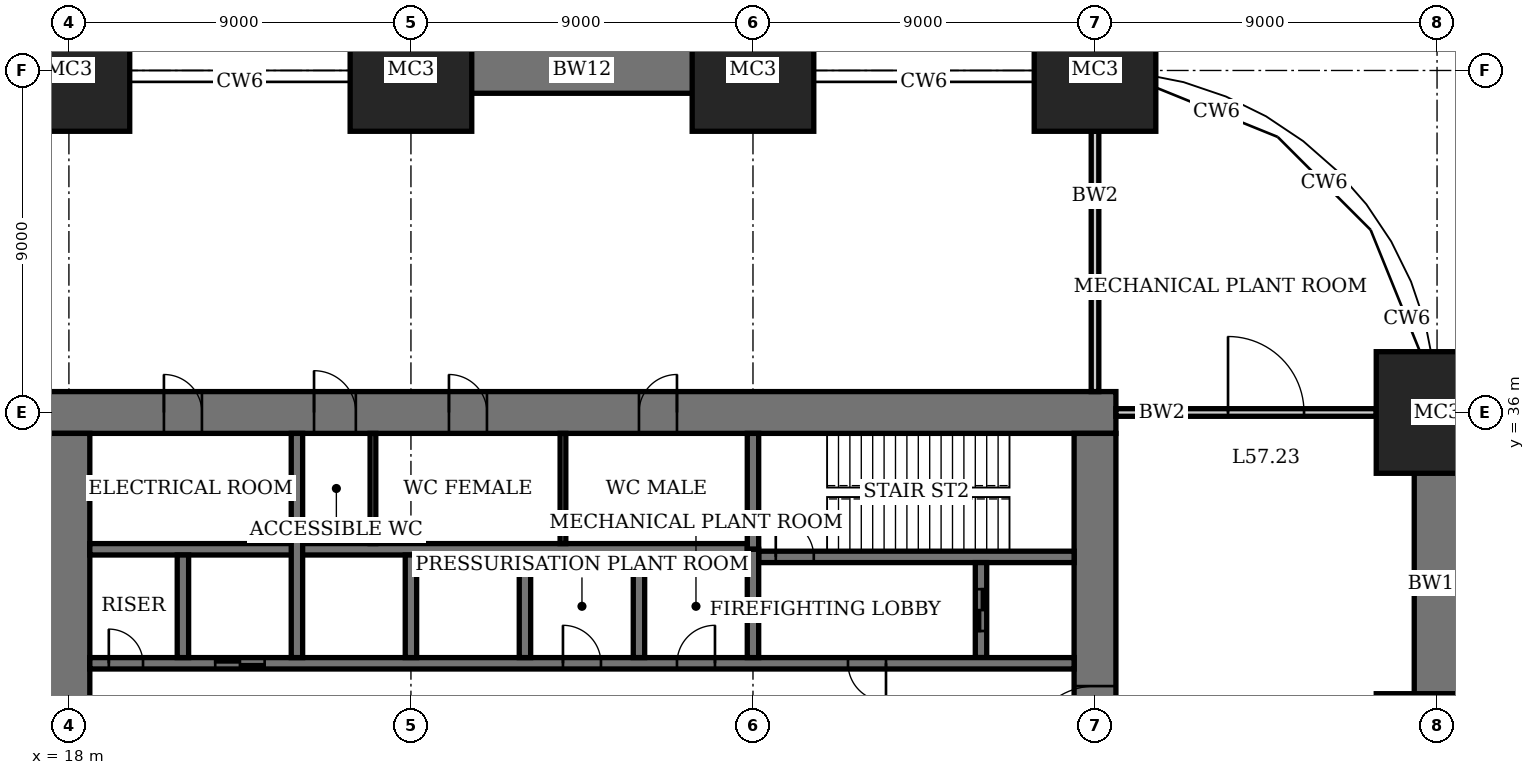
"""IFC4 building model, lengths in metres.
Left out: names, types, materials, properties, quantities, classifications, styles, units other than length and angle.
Written with IfcOpenShell. Run it as: python <this file> out.ifc"""

import sys

from ifc_helpers import new_model, si_unit, direction, frame, frame_2d, origin, origin_2d, place, context, subcontext, project, spatial, rectangle, extrude, element, fill, save


model = new_model("IFC4")
c1 = context("Model", 3, precision=1e-05, world=origin(), true_north=direction((0.0, 1.0)))
c2 = subcontext(c1, "Body", "Model", "MODEL_VIEW")
j1 = project(units=[si_unit("LENGTHUNIT", "METRE"), si_unit("PLANEANGLEUNIT", "RADIAN")], contexts=[c1])
p1 = place(None, origin())
s1 = spatial("IfcSite", under=j1, at=p1, CompositionType="ELEMENT")
p2 = place(p1, origin())
s2 = spatial("IfcBuilding", under=s1, at=p2, CompositionType="ELEMENT")
p3 = place(p2, frame((0.0, 0.0, 234.4)))
s3 = spatial("IfcBuildingStorey", under=s2, at=p3, CompositionType="ELEMENT", Elevation=234.4)
for number, where, z_axis, x_axis in (
    (1, (18.0, 45.0, 0.0), (0.0, 0.0, 1.0), (1.0, 0.0, 0.0)),
    (2, (27.0, 45.0, 0.0), (0.0, 0.0, 1.0), (1.0, 0.0, 0.0)),
    (3, (36.0, 45.0, 0.0), (0.0, 0.0, 1.0), (1.0, 0.0, 0.0)),
    (4, (45.0, 45.0, 0.0), (0.0, 0.0, 1.0), (1.0, 0.0, 0.0)),
    (5, (54.0, 27.0, 0.0), (0.0, 0.0, 1.0), (1.0, 0.0, 0.0)),
    (6, (54.0, 36.0, 0.0), (0.0, 0.0, 1.0), (1.0, 0.0, 0.0)),
):
    element("IfcColumn", number, at=place(p3, frame(where, z_axis=z_axis, x_axis=x_axis)), inside=s3, PredefinedType="COLUMN", context=c2, shape_type="SweptSolid", body=[
        extrude(rectangle(XDim=3.2, YDim=3.2, at=origin_2d()), origin(), (0.0, 0.0, 1.0), 5.0),
    ])
p4 = place(p3, frame((45.55, 36.0, 0.0), z_axis=(0.0, 0.0, 1.0), x_axis=(-1.0, 0.0, 0.0)))
e7 = element("IfcWall", 7, at=p4, inside=s3, PredefinedType="SHEAR", context=c2, shape_type="SweptSolid", body=[
    extrude(rectangle(XDim=28.1, YDim=1.1, at=frame_2d((14.05, 0.0))), origin(), (0.0, 0.0, 1.0), 5.0),
])
p5 = place(p4, frame((11.55, 0.0, 0.0)))
e8 = element("IfcOpeningElement", 8, at=p5, cuts=e7, PredefinedType="OPENING", context=c2, shape_type="SweptSolid", body=[
    extrude(rectangle(XDim=1.0, YDim=2.4, at=frame_2d((0.5, 1.2))), frame((0.0, 0.56, 0.0), z_axis=(0.0, -1.0, 0.0), x_axis=(1.0, 0.0, 0.0)), (0.0, 0.0, 1.0), 1.12),
])
p6 = place(p4, frame((16.55, 0.0, 0.0)))
e9 = element("IfcOpeningElement", 9, at=p6, cuts=e7, PredefinedType="OPENING", context=c2, shape_type="SweptSolid", body=[
    extrude(rectangle(XDim=1.0, YDim=2.4, at=frame_2d((0.5, 1.2))), frame((0.0, 0.56, 0.0), z_axis=(0.0, -1.0, 0.0), x_axis=(1.0, 0.0, 0.0)), (0.0, 0.0, 1.0), 1.12),
])
p7 = place(p4, frame((20.0, 0.0, 0.0)))
e10 = element("IfcOpeningElement", 10, at=p7, cuts=e7, PredefinedType="OPENING", context=c2, shape_type="SweptSolid", body=[
    extrude(rectangle(XDim=1.1, YDim=2.4, at=frame_2d((0.55, 1.2))), frame((0.0, 0.56, 0.0), z_axis=(0.0, -1.0, 0.0), x_axis=(1.0, 0.0, 0.0)), (0.0, 0.0, 1.0), 1.12),
])
p8 = place(p4, frame((24.05, 0.0, 0.0)))
e11 = element("IfcOpeningElement", 11, at=p8, cuts=e7, PredefinedType="OPENING", context=c2, shape_type="SweptSolid", body=[
    extrude(rectangle(XDim=1.0, YDim=2.4, at=frame_2d((0.5, 1.2))), frame((0.0, 0.56, 0.0), z_axis=(0.0, -1.0, 0.0), x_axis=(1.0, 0.0, 0.0)), (0.0, 0.0, 1.0), 1.12),
])
p9 = place(p3, frame((18.0, 35.45, 0.0), z_axis=(0.0, 0.0, 1.0), x_axis=(0.0, -1.0, 0.0)))
e12 = element("IfcWall", 12, at=p9, inside=s3, PredefinedType="SHEAR", context=c2, shape_type="SweptSolid", body=[
    extrude(rectangle(XDim=16.9, YDim=1.1, at=frame_2d((8.45, 0.0))), origin(), (0.0, 0.0, 1.0), 5.0),
])
p10 = place(p9, frame((8.45, 0.0, 0.0)))
e13 = element("IfcOpeningElement", 13, at=p10, cuts=e12, PredefinedType="OPENING", context=c2, shape_type="SweptSolid", body=[
    extrude(rectangle(XDim=1.8, YDim=2.4, at=frame_2d((0.9, 1.2))), frame((0.0, 0.56, 0.0), z_axis=(0.0, -1.0, 0.0), x_axis=(1.0, 0.0, 0.0)), (0.0, 0.0, 1.0), 1.12),
])
p11 = place(p3, frame((45.0, 18.55, 0.0), z_axis=(0.0, 0.0, 1.0), x_axis=(0.0, 1.0, 0.0)))
e14 = element("IfcWall", 14, at=p11, inside=s3, PredefinedType="SHEAR", context=c2, shape_type="SweptSolid", body=[
    extrude(rectangle(XDim=16.9, YDim=1.1, at=frame_2d((8.45, 0.0))), origin(), (0.0, 0.0, 1.0), 5.0),
])
p12 = place(p11, frame((8.45, 0.0, 0.0)))
e15 = element("IfcOpeningElement", 15, at=p12, cuts=e14, PredefinedType="OPENING", context=c2, shape_type="SweptSolid", body=[
    extrude(rectangle(XDim=1.8, YDim=2.4, at=frame_2d((0.9, 1.2))), frame((0.0, 0.56, 0.0), z_axis=(0.0, -1.0, 0.0), x_axis=(1.0, 0.0, 0.0)), (0.0, 0.0, 1.0), 1.12),
])
p13 = place(p3, frame((36.15, 32.2, 0.0), z_axis=(0.0, 0.0, 1.0), x_axis=(1.0, 0.0, 0.0)))
e16 = element("IfcWall", 16, at=p13, inside=s3, PredefinedType="SHEAR", context=c2, shape_type="SweptSolid", body=[
    extrude(rectangle(XDim=8.3, YDim=0.3, at=frame_2d((4.15, 0.0))), origin(), (0.0, 0.0, 1.0), 5.0),
])
p14 = place(p13, frame((0.45, 0.0, 0.0)))
e17 = element("IfcOpeningElement", 17, at=p14, cuts=e16, PredefinedType="OPENING", context=c2, shape_type="SweptSolid", body=[
    extrude(rectangle(XDim=1.0, YDim=2.4, at=frame_2d((0.5, 1.2))), frame((0.0, 0.16, 0.0), z_axis=(0.0, -1.0, 0.0), x_axis=(1.0, 0.0, 0.0)), (0.0, 0.0, 1.0), 0.32),
])
p15 = place(p3, frame((36.0, 32.4, 0.0), z_axis=(0.0, 0.0, 1.0), x_axis=(0.0, 1.0, 0.0)))
e18 = element("IfcWall", 18, at=p15, inside=s3, PredefinedType="SHEAR", context=c2, shape_type="SweptSolid", body=[
    extrude(rectangle(XDim=3.05, YDim=0.3, at=frame_2d((1.525, 0.0))), origin(), (0.0, 0.0, 1.0), 5.0),
])
p16 = place(p3, frame((42.0, 29.55, 0.0), z_axis=(0.0, 0.0, 1.0), x_axis=(0.0, 1.0, 0.0)))
e19 = element("IfcWall", 19, at=p16, inside=s3, PredefinedType="SHEAR", context=c2, shape_type="SweptSolid", body=[
    extrude(rectangle(XDim=2.5, YDim=0.3, at=frame_2d((1.25, 0.0))), origin(), (0.0, 0.0, 1.0), 5.0),
])
p17 = place(p16, frame((0.7, 0.0, 0.0)))
e20 = element("IfcOpeningElement", 20, at=p17, cuts=e19, PredefinedType="OPENING", context=c2, shape_type="SweptSolid", body=[
    extrude(rectangle(XDim=1.1, YDim=2.4, at=frame_2d((0.55, 1.2))), frame((0.0, 0.16, 0.0), z_axis=(0.0, -1.0, 0.0), x_axis=(1.0, 0.0, 0.0)), (0.0, 0.0, 1.0), 0.32),
])
p18 = place(p3, frame((18.55, 29.4, 0.0), z_axis=(0.0, 0.0, 1.0), x_axis=(1.0, 0.0, 0.0)))
e21 = element("IfcWall", 21, at=p18, inside=s3, PredefinedType="SHEAR", context=c2, shape_type="SweptSolid", body=[
    extrude(rectangle(XDim=25.9, YDim=0.3, at=frame_2d((12.95, 0.0))), origin(), (0.0, 0.0, 1.0), 5.0),
])
p19 = place(p18, frame((19.95, 0.0, 0.0)))
e22 = element("IfcOpeningElement", 22, at=p19, cuts=e21, PredefinedType="OPENING", context=c2, shape_type="SweptSolid", body=[
    extrude(rectangle(XDim=1.0, YDim=2.4, at=frame_2d((0.5, 1.2))), frame((0.0, 0.16, 0.0), z_axis=(0.0, -1.0, 0.0), x_axis=(1.0, 0.0, 0.0)), (0.0, 0.0, 1.0), 0.32),
])
p20 = place(p18, frame((0.5, 0.0, 0.0)))
e23 = element("IfcOpeningElement", 23, at=p20, cuts=e21, PredefinedType="OPENING", context=c2, shape_type="SweptSolid", body=[
    extrude(rectangle(XDim=0.9, YDim=2.1, at=frame_2d((0.45, 1.05))), frame((0.0, 0.16, 0.0), z_axis=(0.0, -1.0, 0.0), x_axis=(1.0, 0.0, 0.0)), (0.0, 0.0, 1.0), 0.32),
])
p21 = place(p18, frame((15.45, 0.0, 0.0)))
e24 = element("IfcOpeningElement", 24, at=p21, cuts=e21, PredefinedType="OPENING", context=c2, shape_type="SweptSolid", body=[
    extrude(rectangle(XDim=1.0, YDim=2.4, at=frame_2d((0.5, 1.2))), frame((0.0, 0.16, 0.0), z_axis=(0.0, -1.0, 0.0), x_axis=(1.0, 0.0, 0.0)), (0.0, 0.0, 1.0), 0.32),
])
p22 = place(p18, frame((12.45, 0.0, 0.0)))
e25 = element("IfcOpeningElement", 25, at=p22, cuts=e21, PredefinedType="OPENING", context=c2, shape_type="SweptSolid", body=[
    extrude(rectangle(XDim=1.0, YDim=2.4, at=frame_2d((0.5, 1.2))), frame((0.0, 0.16, 0.0), z_axis=(0.0, -1.0, 0.0), x_axis=(1.0, 0.0, 0.0)), (0.0, 0.0, 1.0), 0.32),
])
p23 = place(p18, frame((3.3, 0.0, 0.0)))
e26 = element("IfcOpeningElement", 26, at=p23, cuts=e21, PredefinedType="OPENING", context=c2, shape_type="SweptSolid", body=[
    extrude(rectangle(XDim=1.3, YDim=2.4, at=frame_2d((0.65, 1.2))), frame((0.0, 0.16, 0.0), z_axis=(0.0, -1.0, 0.0), x_axis=(1.0, 0.0, 0.0)), (0.0, 0.0, 1.0), 0.32),
])
p24 = place(p3, frame((18.55, 32.4, 0.0), z_axis=(0.0, 0.0, 1.0), x_axis=(1.0, 0.0, 0.0)))
e27 = element("IfcWall", 27, at=p24, inside=s3, PredefinedType="SHEAR", context=c2, shape_type="SweptSolid", body=[
    extrude(rectangle(XDim=17.3, YDim=0.3, at=frame_2d((8.65, 0.0))), origin(), (0.0, 0.0, 1.0), 5.0),
])
for number, where, z_axis, x_axis in (
    (28, (33.0, 29.55, 0.0), (0.0, 0.0, 1.0), (0.0, 1.0, 0.0)),
    (29, (30.0, 29.55, 0.0), (0.0, 0.0, 1.0), (0.0, 1.0, 0.0)),
    (30, (27.0, 29.55, 0.0), (0.0, 0.0, 1.0), (0.0, 1.0, 0.0)),
):
    element("IfcWall", number, at=place(p3, frame(where, z_axis=z_axis, x_axis=x_axis)), inside=s3, PredefinedType="SHEAR", context=c2, shape_type="SweptSolid", body=[
        extrude(rectangle(XDim=2.7, YDim=0.3, at=frame_2d((1.35, 0.0))), origin(), (0.0, 0.0, 1.0), 5.0),
    ])
p25 = place(p3, frame((24.0, 29.55, 0.0), z_axis=(0.0, 0.0, 1.0), x_axis=(0.0, 1.0, 0.0)))
e31 = element("IfcWall", 31, at=p25, inside=s3, PredefinedType="SHEAR", context=c2, shape_type="SweptSolid", body=[
    extrude(rectangle(XDim=5.9, YDim=0.3, at=frame_2d((2.95, 0.0))), origin(), (0.0, 0.0, 1.0), 5.0),
])
p26 = place(p3, frame((21.0, 29.55, 0.0), z_axis=(0.0, 0.0, 1.0), x_axis=(0.0, 1.0, 0.0)))
e32 = element("IfcWall", 32, at=p26, inside=s3, PredefinedType="SHEAR", context=c2, shape_type="SweptSolid", body=[
    extrude(rectangle(XDim=2.7, YDim=0.3, at=frame_2d((1.35, 0.0))), origin(), (0.0, 0.0, 1.0), 5.0),
])
p27 = place(p3, frame((36.0, 29.55, 0.0), z_axis=(0.0, 0.0, 1.0), x_axis=(0.0, 1.0, 0.0)))
e33 = element("IfcWall", 33, at=p27, inside=s3, PredefinedType="SHEAR", context=c2, shape_type="SweptSolid", body=[
    extrude(rectangle(XDim=2.85, YDim=0.3, at=frame_2d((1.425, 0.0))), origin(), (0.0, 0.0, 1.0), 5.0),
])
p28 = place(p3, frame((9.0, 45.0, 0.0), z_axis=(0.0, 0.0, 1.0), x_axis=(1.0, 0.0, 0.0)))
e34 = element("IfcWall", 34, at=p28, inside=s3, PredefinedType="SHEAR", context=c2, shape_type="SweptSolid", body=[
    extrude(rectangle(XDim=9.0, YDim=2.4, at=frame_2d((4.5, 0.0))), origin(), (0.0, 0.0, 1.0), 5.0),
])
for number, where, z_axis, x_axis in (
    (35, (27.0, 45.0, 0.0), (0.0, 0.0, 1.0), (1.0, 0.0, 0.0)),
    (36, (54.0, 27.0, 0.0), (0.0, 0.0, 1.0), (0.0, 1.0, 0.0)),
):
    element("IfcWall", number, at=place(p3, frame(where, z_axis=z_axis, x_axis=x_axis)), inside=s3, PredefinedType="SHEAR", context=c2, shape_type="SweptSolid", body=[
        extrude(rectangle(XDim=9.0, YDim=1.2, at=frame_2d((4.5, 0.0))), origin(), (0.0, 0.0, 1.0), 5.0),
    ])
p29 = place(p3, frame((45.0, 36.55, 0.0), z_axis=(0.0, 0.0, 1.0), x_axis=(0.0, 1.0, 0.0)))
e37 = element("IfcWall", 37, at=p29, inside=s3, PredefinedType="SOLIDWALL", context=c2, shape_type="SweptSolid", body=[
    extrude(rectangle(XDim=6.85, YDim=0.2, at=frame_2d((3.425, 0.0))), origin(), (0.0, 0.0, 1.0), 4.0),
])
p30 = place(p3, frame((45.55, 36.0, 0.0), z_axis=(0.0, 0.0, 1.0), x_axis=(1.0, 0.0, 0.0)))
e38 = element("IfcWall", 38, at=p30, inside=s3, PredefinedType="SOLIDWALL", context=c2, shape_type="SweptSolid", body=[
    extrude(rectangle(XDim=6.85, YDim=0.2, at=frame_2d((3.425, 0.0))), origin(), (0.0, 0.0, 1.0), 4.0),
])
p31 = place(p30, frame((2.95, 0.0, 0.0)))
e39 = element("IfcOpeningElement", 39, at=p31, cuts=e38, PredefinedType="OPENING", context=c2, shape_type="SweptSolid", body=[
    extrude(rectangle(XDim=2.0, YDim=2.7, at=frame_2d((1.0, 1.35))), frame((0.0, 0.11, 0.0), z_axis=(0.0, -1.0, 0.0), x_axis=(1.0, 0.0, 0.0)), (0.0, 0.0, 1.0), 0.22),
])
for number, where, z_axis, x_axis in (
    (40, (31.0, 32.55, 0.0), (0.0, 0.0, 1.0), (0.0, 1.0, 0.0)),
    (41, (26.0, 32.55, 0.0), (0.0, 0.0, 1.0), (0.0, 1.0, 0.0)),
):
    element("IfcWall", number, at=place(p3, frame(where, z_axis=z_axis, x_axis=x_axis)), inside=s3, PredefinedType="PARTITIONING", context=c2, shape_type="SweptSolid", body=[
        extrude(rectangle(XDim=2.9, YDim=0.15, at=frame_2d((1.45, 0.0))), origin(), (0.0, 0.0, 1.0), 4.6),
    ])
p32 = place(p12, origin())
e42 = element("IfcDoor", 42, at=p32, inside=s3, OperationType="DOUBLE_DOOR_DOUBLE_SWING", PredefinedType="DOOR", context=c2, shape_type="SweptSolid", body=[
    extrude(rectangle(XDim=1.8, YDim=2.4, at=frame_2d((0.9, 1.2))), frame((0.0, 0.03, 0.0), z_axis=(0.0, -1.0, 0.0), x_axis=(1.0, 0.0, 0.0)), (0.0, 0.0, 1.0), 0.06),
    extrude(rectangle(XDim=0.04, YDim=2.4, at=frame_2d((0.02, 1.2))), frame((0.0, 0.55, 0.0), z_axis=(0.0, -1.0, 0.0), x_axis=(1.0, 0.0, 0.0)), (0.0, 0.0, 1.0), 1.1),
    extrude(rectangle(XDim=0.04, YDim=2.4, at=frame_2d((1.78, 1.2))), frame((0.0, 0.55, 0.0), z_axis=(0.0, -1.0, 0.0), x_axis=(1.0, 0.0, 0.0)), (0.0, 0.0, 1.0), 1.1),
    extrude(rectangle(XDim=1.8, YDim=0.04, at=frame_2d((0.9, 2.38))), frame((0.0, 0.55, 0.0), z_axis=(0.0, -1.0, 0.0), x_axis=(1.0, 0.0, 0.0)), (0.0, 0.0, 1.0), 1.1),
])
fill(e15, e42)
p33 = place(p5, origin())
e43 = element("IfcDoor", 43, at=p33, inside=s3, OperationType="SINGLE_SWING_LEFT", PredefinedType="DOOR", context=c2, shape_type="SweptSolid", body=[
    extrude(rectangle(XDim=1.0, YDim=2.4, at=frame_2d((0.5, 1.2))), frame((0.0, 0.025, 0.0), z_axis=(0.0, -1.0, 0.0), x_axis=(1.0, 0.0, 0.0)), (0.0, 0.0, 1.0), 0.05),
    extrude(rectangle(XDim=0.04, YDim=2.4, at=frame_2d((0.02, 1.2))), frame((0.0, 0.4, 0.0), z_axis=(0.0, -1.0, 0.0), x_axis=(1.0, 0.0, 0.0)), (0.0, 0.0, 1.0), 0.8),
    extrude(rectangle(XDim=0.04, YDim=2.4, at=frame_2d((0.98, 1.2))), frame((0.0, 0.4, 0.0), z_axis=(0.0, -1.0, 0.0), x_axis=(1.0, 0.0, 0.0)), (0.0, 0.0, 1.0), 0.8),
    extrude(rectangle(XDim=1.0, YDim=0.04, at=frame_2d((0.5, 2.38))), frame((0.0, 0.4, 0.0), z_axis=(0.0, -1.0, 0.0), x_axis=(1.0, 0.0, 0.0)), (0.0, 0.0, 1.0), 0.8),
])
fill(e8, e43)
p34 = place(p6, origin())
e44 = element("IfcDoor", 44, at=p34, inside=s3, OperationType="SINGLE_SWING_RIGHT", PredefinedType="DOOR", context=c2, shape_type="SweptSolid", body=[
    extrude(rectangle(XDim=1.0, YDim=2.4, at=frame_2d((0.5, 1.2))), frame((0.0, 0.025, 0.0), z_axis=(0.0, -1.0, 0.0), x_axis=(1.0, 0.0, 0.0)), (0.0, 0.0, 1.0), 0.05),
    extrude(rectangle(XDim=0.04, YDim=2.4, at=frame_2d((0.02, 1.2))), frame((0.0, 0.4, 0.0), z_axis=(0.0, -1.0, 0.0), x_axis=(1.0, 0.0, 0.0)), (0.0, 0.0, 1.0), 0.8),
    extrude(rectangle(XDim=0.04, YDim=2.4, at=frame_2d((0.98, 1.2))), frame((0.0, 0.4, 0.0), z_axis=(0.0, -1.0, 0.0), x_axis=(1.0, 0.0, 0.0)), (0.0, 0.0, 1.0), 0.8),
    extrude(rectangle(XDim=1.0, YDim=0.04, at=frame_2d((0.5, 2.38))), frame((0.0, 0.4, 0.0), z_axis=(0.0, -1.0, 0.0), x_axis=(1.0, 0.0, 0.0)), (0.0, 0.0, 1.0), 0.8),
])
fill(e9, e44)
p35 = place(p7, origin())
e45 = element("IfcDoor", 45, at=p35, inside=s3, OperationType="SINGLE_SWING_RIGHT", PredefinedType="DOOR", context=c2, shape_type="SweptSolid", body=[
    extrude(rectangle(XDim=1.1, YDim=2.4, at=frame_2d((0.55, 1.2))), frame((0.0, 0.025, 0.0), z_axis=(0.0, -1.0, 0.0), x_axis=(1.0, 0.0, 0.0)), (0.0, 0.0, 1.0), 0.05),
    extrude(rectangle(XDim=0.04, YDim=2.4, at=frame_2d((0.02, 1.2))), frame((0.0, 0.44, 0.0), z_axis=(0.0, -1.0, 0.0), x_axis=(1.0, 0.0, 0.0)), (0.0, 0.0, 1.0), 0.88),
    extrude(rectangle(XDim=0.04, YDim=2.4, at=frame_2d((1.08, 1.2))), frame((0.0, 0.44, 0.0), z_axis=(0.0, -1.0, 0.0), x_axis=(1.0, 0.0, 0.0)), (0.0, 0.0, 1.0), 0.88),
    extrude(rectangle(XDim=1.1, YDim=0.04, at=frame_2d((0.55, 2.38))), frame((0.0, 0.44, 0.0), z_axis=(0.0, -1.0, 0.0), x_axis=(1.0, 0.0, 0.0)), (0.0, 0.0, 1.0), 0.88),
])
fill(e10, e45)
p36 = place(p8, origin())
e46 = element("IfcDoor", 46, at=p36, inside=s3, OperationType="SINGLE_SWING_RIGHT", PredefinedType="DOOR", context=c2, shape_type="SweptSolid", body=[
    extrude(rectangle(XDim=1.0, YDim=2.4, at=frame_2d((0.5, 1.2))), frame((0.0, 0.025, 0.0), z_axis=(0.0, -1.0, 0.0), x_axis=(1.0, 0.0, 0.0)), (0.0, 0.0, 1.0), 0.05),
    extrude(rectangle(XDim=0.04, YDim=2.4, at=frame_2d((0.02, 1.2))), frame((0.0, 0.4, 0.0), z_axis=(0.0, -1.0, 0.0), x_axis=(1.0, 0.0, 0.0)), (0.0, 0.0, 1.0), 0.8),
    extrude(rectangle(XDim=0.04, YDim=2.4, at=frame_2d((0.98, 1.2))), frame((0.0, 0.4, 0.0), z_axis=(0.0, -1.0, 0.0), x_axis=(1.0, 0.0, 0.0)), (0.0, 0.0, 1.0), 0.8),
    extrude(rectangle(XDim=1.0, YDim=0.04, at=frame_2d((0.5, 2.38))), frame((0.0, 0.4, 0.0), z_axis=(0.0, -1.0, 0.0), x_axis=(1.0, 0.0, 0.0)), (0.0, 0.0, 1.0), 0.8),
])
fill(e11, e46)
p37 = place(p14, origin())
e47 = element("IfcDoor", 47, at=p37, inside=s3, OperationType="SINGLE_SWING_RIGHT", PredefinedType="DOOR", context=c2, shape_type="SweptSolid", body=[
    extrude(rectangle(XDim=1.0, YDim=2.4, at=frame_2d((0.5, 1.2))), frame((0.0, 0.03, 0.0), z_axis=(0.0, -1.0, 0.0), x_axis=(1.0, 0.0, 0.0)), (0.0, 0.0, 1.0), 0.06),
])
fill(e17, e47)
p38 = place(p19, origin())
e48 = element("IfcDoor", 48, at=p38, inside=s3, OperationType="SINGLE_SWING_RIGHT", PredefinedType="DOOR", context=c2, shape_type="SweptSolid", body=[
    extrude(rectangle(XDim=1.0, YDim=2.4, at=frame_2d((0.5, 1.2))), frame((0.0, 0.03, 0.0), z_axis=(0.0, -1.0, 0.0), x_axis=(1.0, 0.0, 0.0)), (0.0, 0.0, 1.0), 0.06),
])
fill(e22, e48)
p39 = place(p20, origin())
e49 = element("IfcDoor", 49, at=p39, inside=s3, OperationType="SINGLE_SWING_RIGHT", PredefinedType="DOOR", context=c2, shape_type="SweptSolid", body=[
    extrude(rectangle(XDim=0.9, YDim=2.1, at=frame_2d((0.45, 1.05))), frame((0.0, 0.03, 0.0), z_axis=(0.0, -1.0, 0.0), x_axis=(1.0, 0.0, 0.0)), (0.0, 0.0, 1.0), 0.06),
])
fill(e23, e49)
p40 = place(p31, origin())
e50 = element("IfcDoor", 50, at=p40, inside=s3, OperationType="DOUBLE_DOOR_SINGLE_SWING", PredefinedType="DOOR", context=c2, shape_type="SweptSolid", body=[
    extrude(rectangle(XDim=2.0, YDim=2.7, at=frame_2d((1.0, 1.35))), frame((0.0, 0.03, 0.0), z_axis=(0.0, -1.0, 0.0), x_axis=(1.0, 0.0, 0.0)), (0.0, 0.0, 1.0), 0.06),
])
fill(e39, e50)
p41 = place(p21, origin())
e51 = element("IfcDoor", 51, at=p41, inside=s3, OperationType="SINGLE_SWING_LEFT", PredefinedType="DOOR", context=c2, shape_type="SweptSolid", body=[
    extrude(rectangle(XDim=1.0, YDim=2.4, at=frame_2d((0.5, 1.2))), frame((0.0, 0.03, 0.0), z_axis=(0.0, -1.0, 0.0), x_axis=(1.0, 0.0, 0.0)), (0.0, 0.0, 1.0), 0.06),
])
fill(e24, e51)
p42 = place(p22, origin())
e52 = element("IfcDoor", 52, at=p42, inside=s3, OperationType="SINGLE_SWING_RIGHT", PredefinedType="DOOR", context=c2, shape_type="SweptSolid", body=[
    extrude(rectangle(XDim=1.0, YDim=2.4, at=frame_2d((0.5, 1.2))), frame((0.0, 0.03, 0.0), z_axis=(0.0, -1.0, 0.0), x_axis=(1.0, 0.0, 0.0)), (0.0, 0.0, 1.0), 0.06),
])
fill(e25, e52)
p43 = place(p23, origin())
e53 = element("IfcDoor", 53, at=p43, inside=s3, OperationType="DOUBLE_DOOR_SLIDING", PredefinedType="DOOR", context=c2, shape_type="SweptSolid", body=[
    extrude(rectangle(XDim=1.3, YDim=2.4, at=frame_2d((0.65, 1.2))), frame((0.0, 0.02, 0.0), z_axis=(0.0, -1.0, 0.0), x_axis=(1.0, 0.0, 0.0)), (0.0, 0.0, 1.0), 0.04),
])
fill(e26, e53)
p44 = place(p17, origin())
e54 = element("IfcDoor", 54, at=p44, inside=s3, OperationType="DOUBLE_DOOR_SLIDING", PredefinedType="DOOR", context=c2, shape_type="SweptSolid", body=[
    extrude(rectangle(XDim=1.1, YDim=2.4, at=frame_2d((0.55, 1.2))), frame((0.0, 0.03, 0.0), z_axis=(0.0, -1.0, 0.0), x_axis=(1.0, 0.0, 0.0)), (0.0, 0.0, 1.0), 0.06),
])
fill(e20, e54)
save(model, sys.argv[1])
